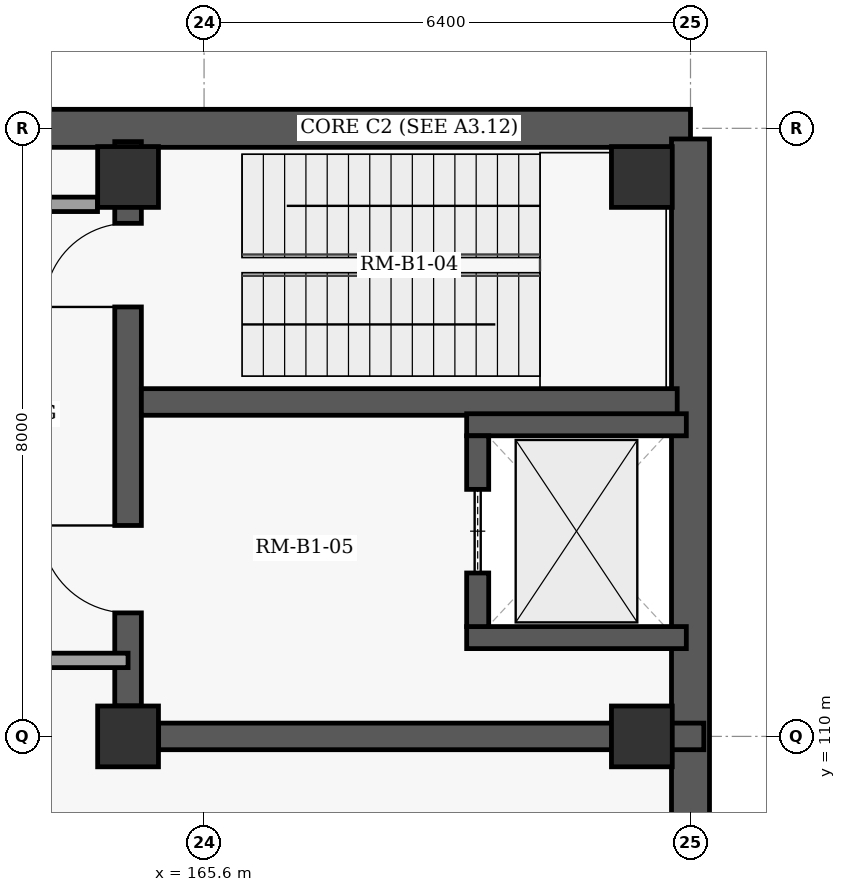
"""IFC4 building model, lengths in metres.
Left out: names, types, materials, properties, quantities, classifications, styles, units other than length and angle.
Written with IfcOpenShell. Run it as: python <this file> out.ifc"""

import sys

from ifc_helpers import new_model, si_unit, direction, frame, frame_2d, origin, origin_2d, place, context, subcontext, project, spatial, rectangle, extrude, element, fill, save


model = new_model("IFC4")
c1 = context("Model", 3, precision=1e-05, world=origin(), true_north=direction((0.0, 1.0)))
c2 = subcontext(c1, "Body", "Model", "MODEL_VIEW")
j1 = project(units=[si_unit("LENGTHUNIT", "METRE"), si_unit("PLANEANGLEUNIT", "RADIAN")], contexts=[c1])
p1 = place(None, origin())
s1 = spatial("IfcSite", under=j1, at=p1, CompositionType="ELEMENT")
p2 = place(p1, origin())
s2 = spatial("IfcBuilding", under=s1, at=p2, CompositionType="ELEMENT")
p3 = place(p2, frame((0.0, 0.0, -4.8)))
s3 = spatial("IfcBuildingStorey", under=s2, at=p3, CompositionType="ELEMENT", Elevation=-4.8)
for number, where, z_axis, x_axis in (
    (1, (164.6, 110.0, 0.0), (0.0, 0.0, 1.0), (1.0, 0.0, 0.0)),
    (2, (164.6, 117.36, 0.0), (0.0, 0.0, 1.0), (1.0, 0.0, 0.0)),
    (3, (171.36, 110.0, 0.0), (0.0, 0.0, 1.0), (1.0, 0.0, 0.0)),
    (4, (171.36, 117.36, 0.0), (0.0, 0.0, 1.0), (1.0, 0.0, 0.0)),
):
    element("IfcColumn", number, at=place(p3, frame(where, z_axis=z_axis, x_axis=x_axis)), inside=s3, PredefinedType="COLUMN", context=c2, shape_type="SweptSolid", body=[
        extrude(rectangle(XDim=0.8, YDim=0.8, at=origin_2d()), origin(), (0.0, 0.0, 1.0), 4.8),
    ])
p4 = place(p3, frame((139.6, 118.0, 0.0), z_axis=(0.0, 0.0, 1.0), x_axis=(1.0, 0.0, 0.0)))
e5 = element("IfcWall", 5, at=p4, inside=s3, PredefinedType="USERDEFINED", context=c2, shape_type="SweptSolid", body=[
    extrude(rectangle(XDim=32.4, YDim=0.5, at=frame_2d((16.2, 0.0))), origin(), (0.0, 0.0, 1.0), 4.5),
])
p5 = place(p3, frame((172.0, 117.86, 0.0), z_axis=(0.0, 0.0, 1.0), x_axis=(0.0, -1.0, 0.0)))
e6 = element("IfcWall", 6, at=p5, inside=s3, PredefinedType="USERDEFINED", context=c2, shape_type="SweptSolid", body=[
    extrude(rectangle(XDim=46.12, YDim=0.5, at=frame_2d((23.06, 0.0))), origin(), (0.0, 0.0, 1.0), 4.5),
])
p6 = place(p3, frame((165.002, 110.0, 0.0), z_axis=(0.0, 0.0, 1.0), x_axis=(1.0, 0.0, 0.0)))
e7 = element("IfcWall", 7, at=p6, inside=s3, PredefinedType="SHEAR", context=c2, shape_type="SweptSolid", body=[
    extrude(rectangle(XDim=7.173, YDim=0.35, at=frame_2d((3.586, 0.0))), origin(), (0.0, 0.0, 1.0), 4.5),
])
p7 = place(p3, frame((164.6, 110.402, 0.0), z_axis=(0.0, 0.0, 1.0), x_axis=(0.0, 1.0, 0.0)))
e8 = element("IfcWall", 8, at=p7, inside=s3, PredefinedType="SHEAR", context=c2, shape_type="SweptSolid", body=[
    extrude(rectangle(XDim=7.423, YDim=0.35, at=frame_2d((3.711, 0.0))), origin(), (0.0, 0.0, 1.0), 4.5),
])
p8 = place(p7, frame((5.248, 0.0, 0.0)))
e9 = element("IfcOpeningElement", 9, at=p8, cuts=e8, PredefinedType="OPENING", context=c2, shape_type="SweptSolid", body=[
    extrude(rectangle(XDim=1.1, YDim=2.15, at=frame_2d((0.55, 1.075))), frame((0.0, 0.185, 0.0), z_axis=(0.0, -1.0, 0.0), x_axis=(1.0, 0.0, 0.0)), (0.0, 0.0, 1.0), 0.37),
])
p9 = place(p7, frame((1.223, 0.0, 0.0)))
e10 = element("IfcOpeningElement", 10, at=p9, cuts=e8, PredefinedType="OPENING", context=c2, shape_type="SweptSolid", body=[
    extrude(rectangle(XDim=1.15, YDim=2.2, at=frame_2d((0.575, 1.1))), frame((0.0, 0.185, 0.0), z_axis=(0.0, -1.0, 0.0), x_axis=(1.0, 0.0, 0.0)), (0.0, 0.0, 1.0), 0.37),
])
p10 = place(p3, frame((164.775, 114.4, 0.0), z_axis=(0.0, 0.0, 1.0), x_axis=(1.0, 0.0, 0.0)))
e11 = element("IfcWall", 11, at=p10, inside=s3, PredefinedType="SHEAR", context=c2, shape_type="SweptSolid", body=[
    extrude(rectangle(XDim=7.05, YDim=0.35, at=frame_2d((3.525, 0.0))), origin(), (0.0, 0.0, 1.0), 4.5),
])
for number, where, z_axis, x_axis in (
    (12, (169.055, 111.3, 0.0), (0.0, 0.0, 1.0), (1.0, 0.0, 0.0)),
    (13, (169.055, 114.1, 0.0), (0.0, 0.0, 1.0), (1.0, 0.0, 0.0)),
):
    element("IfcWall", number, at=place(p3, frame(where, z_axis=z_axis, x_axis=x_axis)), inside=s3, PredefinedType="SHEAR", context=c2, shape_type="SweptSolid", body=[
        extrude(rectangle(XDim=2.89, YDim=0.29, at=frame_2d((1.445, 0.0))), origin(), (0.0, 0.0, 1.0), 4.5),
    ])
p11 = place(p3, frame((169.2, 111.445, 0.0), z_axis=(0.0, 0.0, 1.0), x_axis=(0.0, 1.0, 0.0)))
e14 = element("IfcWall", 14, at=p11, inside=s3, PredefinedType="SHEAR", context=c2, shape_type="SweptSolid", body=[
    extrude(rectangle(XDim=2.51, YDim=0.29, at=frame_2d((1.255, 0.0))), origin(), (0.0, 0.0, 1.0), 4.5),
])
p12 = place(p11, frame((0.705, 0.0, 0.0)))
e15 = element("IfcOpeningElement", 15, at=p12, cuts=e14, PredefinedType="OPENING", context=c2, shape_type="SweptSolid", body=[
    extrude(rectangle(XDim=1.1, YDim=2.15, at=frame_2d((0.55, 1.075))), frame((0.0, 0.155, 0.0), z_axis=(0.0, -1.0, 0.0), x_axis=(1.0, 0.0, 0.0)), (0.0, 0.0, 1.0), 0.31),
])
p13 = place(p3, frame((160.105, 111.0, 0.0), z_axis=(0.0, 0.0, 1.0), x_axis=(1.0, 0.0, 0.0)))
e16 = element("IfcWall", 16, at=p13, inside=s3, PredefinedType="PARTITIONING", context=c2, shape_type="SweptSolid", body=[
    extrude(rectangle(XDim=4.495, YDim=0.19, at=frame_2d((2.248, 0.0))), origin(), (0.0, 0.0, 1.0), 4.5),
])
p14 = place(p3, frame((160.105, 117.0, 0.0), z_axis=(0.0, 0.0, 1.0), x_axis=(1.0, 0.0, 0.0)))
e17 = element("IfcWall", 17, at=p14, inside=s3, PredefinedType="PARTITIONING", context=c2, shape_type="SweptSolid", body=[
    extrude(rectangle(XDim=4.093, YDim=0.19, at=frame_2d((2.046, 0.0))), origin(), (0.0, 0.0, 1.0), 3.85),
])
p15 = place(p8, origin())
e18 = element("IfcDoor", 18, at=p15, inside=s3, OperationType="SINGLE_SWING_LEFT", PredefinedType="DOOR", context=c2, shape_type="SweptSolid", body=[
    extrude(rectangle(XDim=1.1, YDim=2.15, at=frame_2d((0.55, 1.075))), frame((0.0, 0.025, 0.0), z_axis=(0.0, -1.0, 0.0), x_axis=(1.0, 0.0, 0.0)), (0.0, 0.0, 1.0), 0.05),
])
fill(e9, e18)
p16 = place(p9, origin())
e19 = element("IfcDoor", 19, at=p16, inside=s3, OperationType="SINGLE_SWING_RIGHT", PredefinedType="DOOR", context=c2, shape_type="SweptSolid", body=[
    extrude(rectangle(XDim=1.15, YDim=2.2, at=frame_2d((0.575, 1.1))), frame((0.0, 0.025, 0.0), z_axis=(0.0, -1.0, 0.0), x_axis=(1.0, 0.0, 0.0)), (0.0, 0.0, 1.0), 0.05),
])
fill(e10, e19)
p17 = place(p12, origin())
e20 = element("IfcDoor", 20, at=p17, inside=s3, OperationType="SLIDING_TO_LEFT", PredefinedType="DOOR", context=c2, shape_type="SweptSolid", body=[
    extrude(rectangle(XDim=1.1, YDim=2.15, at=frame_2d((0.55, 1.075))), frame((0.0, 0.025, 0.0), z_axis=(0.0, -1.0, 0.0), x_axis=(1.0, 0.0, 0.0)), (0.0, 0.0, 1.0), 0.05),
])
fill(e15, e20)
save(model, sys.argv[1])
